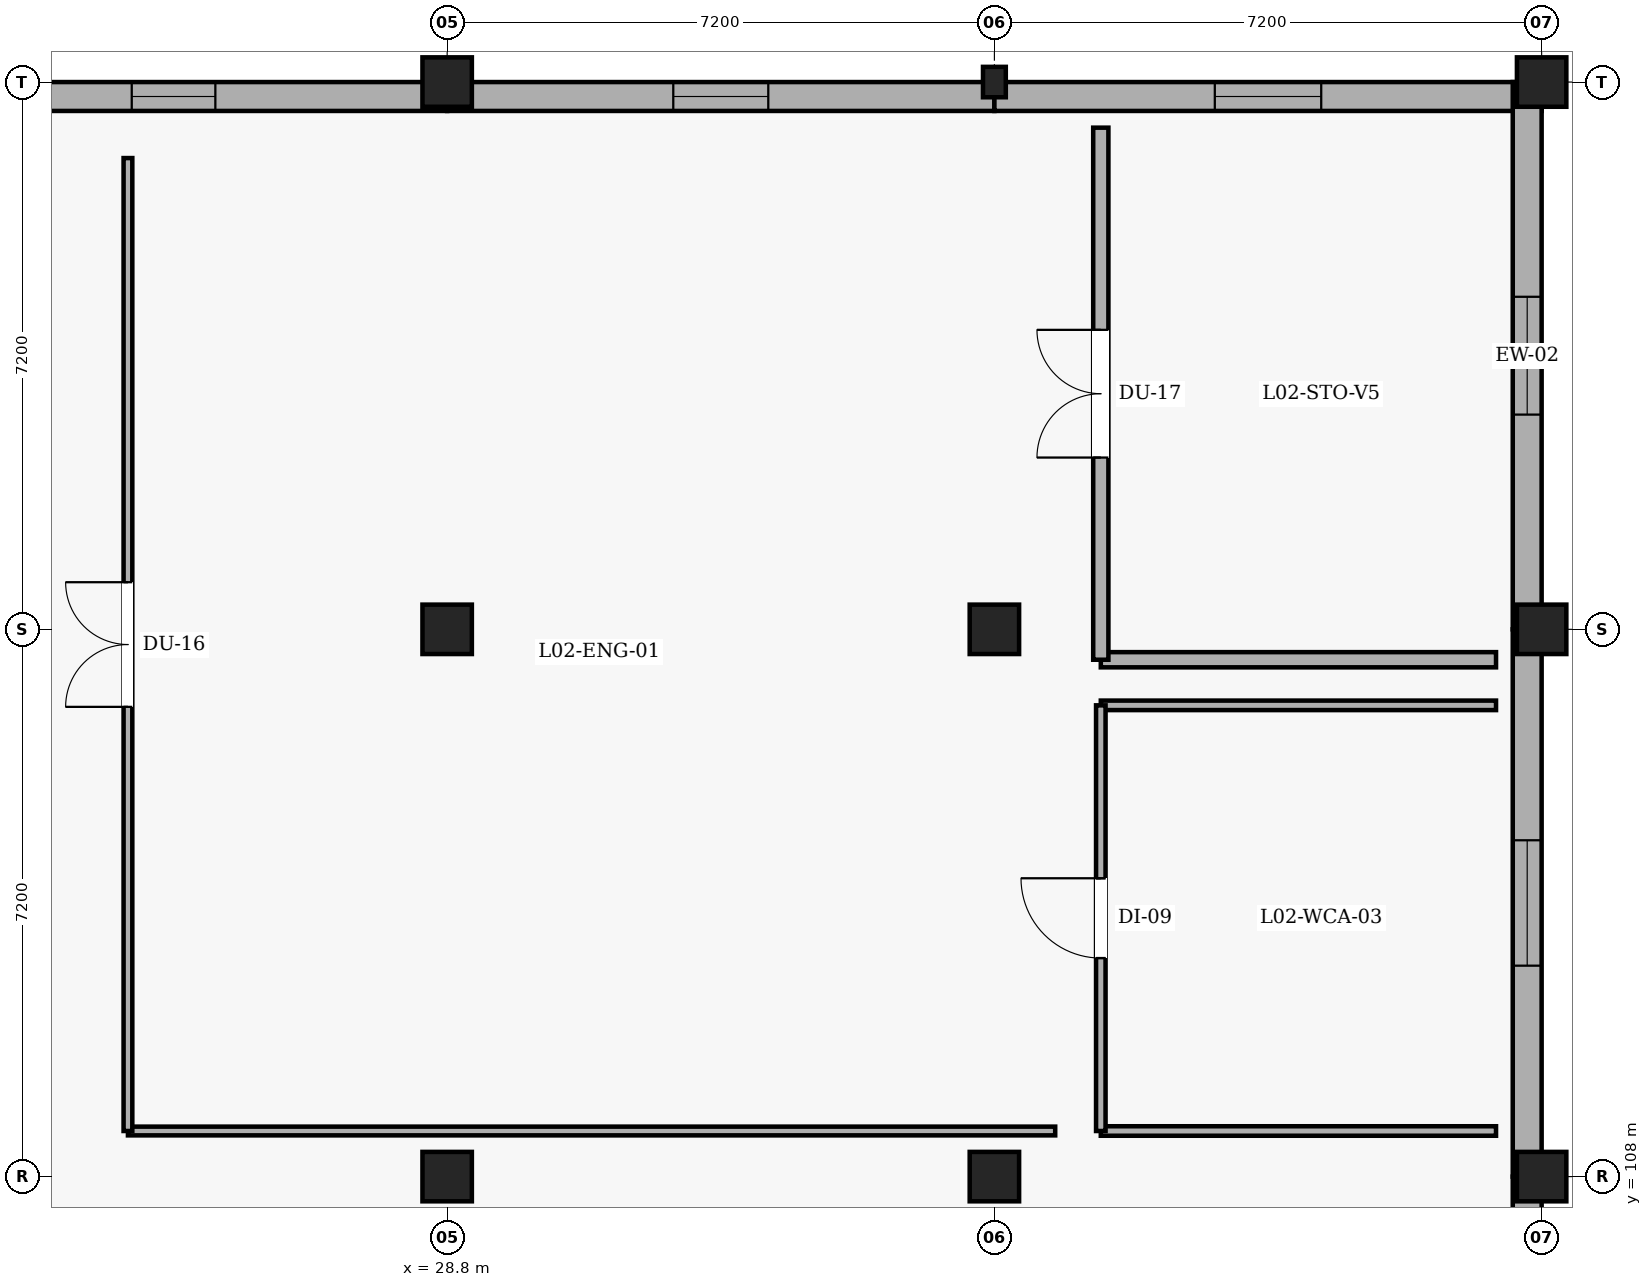
"""IFC4 building model, lengths in metres.
Left out: names, types, materials, properties, quantities, classifications, styles, units other than length and angle.
Written with IfcOpenShell. Run it as: python <this file> out.ifc"""

import sys

from ifc_helpers import new_model, si_unit, direction, frame, frame_2d, origin, origin_2d, place, context, subcontext, project, spatial, rectangle, extrude, element, fill, save


model = new_model("IFC4")
c1 = context("Model", 3, precision=1e-05, world=origin(), true_north=direction((0.0, 1.0)))
c2 = subcontext(c1, "Body", "Model", "MODEL_VIEW")
j1 = project(units=[si_unit("LENGTHUNIT", "METRE"), si_unit("PLANEANGLEUNIT", "RADIAN")], contexts=[c1])
p1 = place(None, origin())
s1 = spatial("IfcSite", under=j1, at=p1, CompositionType="ELEMENT")
p2 = place(p1, origin())
s2 = spatial("IfcBuilding", under=s1, at=p2, CompositionType="ELEMENT")
p3 = place(p2, frame((0.0, 0.0, 9.6)))
s3 = spatial("IfcBuildingStorey", under=s2, at=p3, CompositionType="ELEMENT", Elevation=9.6)
for number, where, z_axis, x_axis in (
    (1, (28.8, 108.0, 0.0), (0.0, 0.0, 1.0), (1.0, 0.0, 0.0)),
    (2, (28.8, 115.2, 0.0), (0.0, 0.0, 1.0), (1.0, 0.0, 0.0)),
    (3, (28.8, 122.4, 0.0), (0.0, 0.0, 1.0), (1.0, 0.0, 0.0)),
    (4, (36.0, 108.0, 0.0), (0.0, 0.0, 1.0), (1.0, 0.0, 0.0)),
    (5, (36.0, 115.2, 0.0), (0.0, 0.0, 1.0), (1.0, 0.0, 0.0)),
):
    element("IfcColumn", number, at=place(p3, frame(where, z_axis=z_axis, x_axis=x_axis)), inside=s3, PredefinedType="COLUMN", context=c2, shape_type="SweptSolid", body=[
        extrude(rectangle(XDim=0.65, YDim=0.65, at=origin_2d()), origin(), (0.0, 0.0, 1.0), 3.88),
    ])
p4 = place(p3, frame((36.0, 122.4, 0.0), z_axis=(0.0, 0.0, 1.0), x_axis=(1.0, 0.0, 0.0)))
e6 = element("IfcColumn", 6, at=p4, inside=s3, PredefinedType="PILASTER", context=c2, shape_type="SweptSolid", body=[
    extrude(rectangle(XDim=0.3, YDim=0.4, at=origin_2d()), origin(), (0.0, 0.0, 1.0), 3.88),
])
for number, where, z_axis, x_axis in (
    (7, (43.2, 108.0, 0.0), (0.0, 0.0, 1.0), (1.0, 0.0, 0.0)),
    (8, (43.2, 115.2, 0.0), (0.0, 0.0, 1.0), (1.0, 0.0, 0.0)),
    (9, (43.2, 122.4, 0.0), (0.0, 0.0, 1.0), (1.0, 0.0, 0.0)),
):
    element("IfcColumn", number, at=place(p3, frame(where, z_axis=z_axis, x_axis=x_axis)), inside=s3, PredefinedType="COLUMN", context=c2, shape_type="SweptSolid", body=[
        extrude(rectangle(XDim=0.65, YDim=0.65, at=origin_2d()), origin(), (0.0, 0.0, 1.0), 3.88),
    ])
p5 = place(p3, frame((21.6, 122.21, 0.0), z_axis=(0.0, 0.0, 1.0), x_axis=(1.0, 0.0, 0.0)))
e10 = element("IfcWall", 10, at=p5, inside=s3, PredefinedType="SOLIDWALL", context=c2, shape_type="SweptSolid", body=[
    extrude(rectangle(XDim=7.2, YDim=0.38, at=frame_2d((3.6, 0.0))), origin(), (0.0, 0.0, 1.0), 3.58),
])
p6 = place(p5, frame((3.05, 0.0, 0.9)))
e11 = element("IfcOpeningElement", 11, at=p6, cuts=e10, PredefinedType="OPENING", context=c2, shape_type="SweptSolid", body=[
    extrude(rectangle(XDim=1.1, YDim=1.2, at=frame_2d((0.55, 0.6))), frame((0.0, 0.2, 0.0), z_axis=(0.0, -1.0, 0.0), x_axis=(1.0, 0.0, 0.0)), (0.0, 0.0, 1.0), 0.4),
])
p7 = place(p3, frame((28.8, 122.21, 0.0), z_axis=(0.0, 0.0, 1.0), x_axis=(1.0, 0.0, 0.0)))
e12 = element("IfcWall", 12, at=p7, inside=s3, PredefinedType="SOLIDWALL", context=c2, shape_type="SweptSolid", body=[
    extrude(rectangle(XDim=7.2, YDim=0.38, at=frame_2d((3.6, 0.0))), origin(), (0.0, 0.0, 1.0), 3.58),
])
p8 = place(p7, frame((2.975, 0.0, 0.9)))
e13 = element("IfcOpeningElement", 13, at=p8, cuts=e12, PredefinedType="OPENING", context=c2, shape_type="SweptSolid", body=[
    extrude(rectangle(XDim=1.25, YDim=1.25, at=frame_2d((0.625, 0.625))), frame((0.0, 0.2, 0.0), z_axis=(0.0, -1.0, 0.0), x_axis=(1.0, 0.0, 0.0)), (0.0, 0.0, 1.0), 0.4),
])
p9 = place(p3, frame((36.0, 122.21, 0.0), z_axis=(0.0, 0.0, 1.0), x_axis=(1.0, 0.0, 0.0)))
e14 = element("IfcWall", 14, at=p9, inside=s3, PredefinedType="SOLIDWALL", context=c2, shape_type="SweptSolid", body=[
    extrude(rectangle(XDim=7.2, YDim=0.38, at=frame_2d((3.6, 0.0))), origin(), (0.0, 0.0, 1.0), 3.64),
])
p10 = place(p9, frame((2.9, 0.0, 0.9)))
e15 = element("IfcOpeningElement", 15, at=p10, cuts=e14, PredefinedType="OPENING", context=c2, shape_type="SweptSolid", body=[
    extrude(rectangle(XDim=1.4, YDim=1.3, at=frame_2d((0.7, 0.65))), frame((0.0, 0.2, 0.0), z_axis=(0.0, -1.0, 0.0), x_axis=(1.0, 0.0, 0.0)), (0.0, 0.0, 1.0), 0.4),
])
p11 = place(p3, frame((43.01, 122.4, 0.0), z_axis=(0.0, 0.0, 1.0), x_axis=(0.0, -1.0, 0.0)))
e16 = element("IfcWall", 16, at=p11, inside=s3, PredefinedType="SOLIDWALL", context=c2, shape_type="SweptSolid", body=[
    extrude(rectangle(XDim=7.2, YDim=0.38, at=frame_2d((3.6, 0.0))), origin(), (0.0, 0.0, 1.0), 3.64),
])
p12 = place(p11, frame((2.825, 0.0, 0.9)))
e17 = element("IfcOpeningElement", 17, at=p12, cuts=e16, PredefinedType="OPENING", context=c2, shape_type="SweptSolid", body=[
    extrude(rectangle(XDim=1.55, YDim=1.35, at=frame_2d((0.775, 0.675))), frame((0.0, 0.2, 0.0), z_axis=(0.0, -1.0, 0.0), x_axis=(1.0, 0.0, 0.0)), (0.0, 0.0, 1.0), 0.4),
])
p13 = place(p3, frame((43.01, 115.2, 0.0), z_axis=(0.0, 0.0, 1.0), x_axis=(0.0, -1.0, 0.0)))
e18 = element("IfcWall", 18, at=p13, inside=s3, PredefinedType="SOLIDWALL", context=c2, shape_type="SweptSolid", body=[
    extrude(rectangle(XDim=7.2, YDim=0.38, at=frame_2d((3.6, 0.0))), origin(), (0.0, 0.0, 1.0), 3.64),
])
p14 = place(p13, frame((2.775, 0.0, 0.9)))
e19 = element("IfcOpeningElement", 19, at=p14, cuts=e18, PredefinedType="OPENING", context=c2, shape_type="SweptSolid", body=[
    extrude(rectangle(XDim=1.65, YDim=1.4, at=frame_2d((0.825, 0.7))), frame((0.0, 0.2, 0.0), z_axis=(0.0, -1.0, 0.0), x_axis=(1.0, 0.0, 0.0)), (0.0, 0.0, 1.0), 0.4),
])
p15 = place(p3, frame((43.01, 108.0, 0.0), z_axis=(0.0, 0.0, 1.0), x_axis=(0.0, -1.0, 0.0)))
e20 = element("IfcWall", 20, at=p15, inside=s3, PredefinedType="SOLIDWALL", context=c2, shape_type="SweptSolid", body=[
    extrude(rectangle(XDim=7.2, YDim=0.38, at=frame_2d((3.6, 0.0))), origin(), (0.0, 0.0, 1.0), 3.64),
])
p16 = place(p15, frame((2.725, 0.0, 0.9)))
e21 = element("IfcOpeningElement", 21, at=p16, cuts=e20, PredefinedType="OPENING", context=c2, shape_type="SweptSolid", body=[
    extrude(rectangle(XDim=1.75, YDim=1.45, at=frame_2d((0.875, 0.725))), frame((0.0, 0.2, 0.0), z_axis=(0.0, -1.0, 0.0), x_axis=(1.0, 0.0, 0.0)), (0.0, 0.0, 1.0), 0.4),
])
p17 = place(p3, frame((36.8, 108.6, 0.0), z_axis=(0.0, 0.0, 1.0), x_axis=(-1.0, 0.0, 0.0)))
e22 = element("IfcWall", 22, at=p17, inside=s3, PredefinedType="PARTITIONING", context=c2, shape_type="SweptSolid", body=[
    extrude(rectangle(XDim=12.2, YDim=0.115, at=frame_2d((6.1, 0.0))), origin(), (0.0, 0.0, 1.0), 3.43),
])
p18 = place(p3, frame((24.6, 108.6, 0.0), z_axis=(0.0, 0.0, 1.0), x_axis=(0.0, 1.0, 0.0)))
e23 = element("IfcWall", 23, at=p18, inside=s3, PredefinedType="PARTITIONING", context=c2, shape_type="SweptSolid", body=[
    extrude(rectangle(XDim=12.8, YDim=0.115, at=frame_2d((6.4, 0.0))), origin(), (0.0, 0.0, 1.0), 3.43),
])
p19 = place(p18, frame((5.58, 0.0, 0.0)))
e24 = element("IfcOpeningElement", 24, at=p19, cuts=e23, PredefinedType="OPENING", context=c2, shape_type="SweptSolid", body=[
    extrude(rectangle(XDim=1.64, YDim=2.2, at=frame_2d((0.82, 1.1))), frame((0.0, 0.067, 0.0), z_axis=(0.0, -1.0, 0.0), x_axis=(1.0, 0.0, 0.0)), (0.0, 0.0, 1.0), 0.135),
])
for number, where, z_axis, x_axis in (
    (25, (37.4, 114.2, 0.0), (0.0, 0.0, 1.0), (1.0, 0.0, 0.0)),
    (26, (42.6, 108.6, 0.0), (0.0, 0.0, 1.0), (-1.0, 0.0, 0.0)),
):
    element("IfcWall", number, at=place(p3, frame(where, z_axis=z_axis, x_axis=x_axis)), inside=s3, PredefinedType="PARTITIONING", context=c2, shape_type="SweptSolid", body=[
        extrude(rectangle(XDim=5.2, YDim=0.125, at=frame_2d((2.6, 0.0))), origin(), (0.0, 0.0, 1.0), 3.85),
    ])
p20 = place(p3, frame((37.4, 108.6, 0.0), z_axis=(0.0, 0.0, 1.0), x_axis=(0.0, 1.0, 0.0)))
e27 = element("IfcWall", 27, at=p20, inside=s3, PredefinedType="PARTITIONING", context=c2, shape_type="SweptSolid", body=[
    extrude(rectangle(XDim=5.6, YDim=0.125, at=frame_2d((2.8, 0.0))), origin(), (0.0, 0.0, 1.0), 3.67),
])
p21 = place(p20, frame((2.275, 0.0, 0.0)))
e28 = element("IfcOpeningElement", 28, at=p21, cuts=e27, PredefinedType="OPENING", context=c2, shape_type="SweptSolid", body=[
    extrude(rectangle(XDim=1.05, YDim=2.1, at=frame_2d((0.525, 1.05))), frame((0.0, 0.073, 0.0), z_axis=(0.0, -1.0, 0.0), x_axis=(1.0, 0.0, 0.0)), (0.0, 0.0, 1.0), 0.145),
])
p22 = place(p3, frame((42.6, 114.8, 0.0), z_axis=(0.0, 0.0, 1.0), x_axis=(-1.0, 0.0, 0.0)))
e29 = element("IfcWall", 29, at=p22, inside=s3, PredefinedType="PARTITIONING", context=c2, shape_type="SweptSolid", body=[
    extrude(rectangle(XDim=5.2, YDim=0.2, at=frame_2d((2.6, 0.0))), origin(), (0.0, 0.0, 1.0), 3.85),
])
p23 = place(p3, frame((37.4, 114.8, 0.0), z_axis=(0.0, 0.0, 1.0), x_axis=(0.0, 1.0, 0.0)))
e30 = element("IfcWall", 30, at=p23, inside=s3, PredefinedType="PARTITIONING", context=c2, shape_type="SweptSolid", body=[
    extrude(rectangle(XDim=7.0, YDim=0.2, at=frame_2d((3.5, 0.0))), origin(), (0.0, 0.0, 1.0), 3.49),
])
p24 = place(p23, frame((2.66, 0.0, 0.0)))
e31 = element("IfcOpeningElement", 31, at=p24, cuts=e30, PredefinedType="OPENING", context=c2, shape_type="SweptSolid", body=[
    extrude(rectangle(XDim=1.68, YDim=2.28, at=frame_2d((0.84, 1.14))), frame((0.0, 0.11, 0.0), z_axis=(0.0, -1.0, 0.0), x_axis=(1.0, 0.0, 0.0)), (0.0, 0.0, 1.0), 0.22),
])
p25 = place(p6, origin())
e32 = element("IfcWindow", 32, at=p25, inside=s3, PartitioningType="SINGLE_PANEL", PredefinedType="WINDOW", context=c2, shape_type="SweptSolid", body=[
    extrude(rectangle(XDim=1.1, YDim=1.2, at=frame_2d((0.55, 0.6))), frame((0.0, 0.03, 0.0), z_axis=(0.0, -1.0, 0.0), x_axis=(1.0, 0.0, 0.0)), (0.0, 0.0, 1.0), 0.06),
])
fill(e11, e32)
p26 = place(p8, origin())
e33 = element("IfcWindow", 33, at=p26, inside=s3, PartitioningType="SINGLE_PANEL", PredefinedType="WINDOW", context=c2, shape_type="SweptSolid", body=[
    extrude(rectangle(XDim=1.25, YDim=1.25, at=frame_2d((0.625, 0.625))), frame((0.0, 0.03, 0.0), z_axis=(0.0, -1.0, 0.0), x_axis=(1.0, 0.0, 0.0)), (0.0, 0.0, 1.0), 0.06),
])
fill(e13, e33)
p27 = place(p10, origin())
e34 = element("IfcWindow", 34, at=p27, inside=s3, PartitioningType="SINGLE_PANEL", PredefinedType="WINDOW", context=c2, shape_type="SweptSolid", body=[
    extrude(rectangle(XDim=1.4, YDim=1.3, at=frame_2d((0.7, 0.65))), frame((0.0, 0.03, 0.0), z_axis=(0.0, -1.0, 0.0), x_axis=(1.0, 0.0, 0.0)), (0.0, 0.0, 1.0), 0.06),
])
fill(e15, e34)
p28 = place(p12, origin())
e35 = element("IfcWindow", 35, at=p28, inside=s3, PartitioningType="SINGLE_PANEL", PredefinedType="WINDOW", context=c2, shape_type="SweptSolid", body=[
    extrude(rectangle(XDim=1.55, YDim=1.35, at=frame_2d((0.775, 0.675))), frame((0.0, 0.03, 0.0), z_axis=(0.0, -1.0, 0.0), x_axis=(1.0, 0.0, 0.0)), (0.0, 0.0, 1.0), 0.06),
])
fill(e17, e35)
p29 = place(p14, origin())
e36 = element("IfcWindow", 36, at=p29, inside=s3, PartitioningType="SINGLE_PANEL", PredefinedType="WINDOW", context=c2, shape_type="SweptSolid", body=[
    extrude(rectangle(XDim=1.65, YDim=1.4, at=frame_2d((0.825, 0.7))), frame((0.0, 0.03, 0.0), z_axis=(0.0, -1.0, 0.0), x_axis=(1.0, 0.0, 0.0)), (0.0, 0.0, 1.0), 0.06),
])
fill(e19, e36)
p30 = place(p19, origin())
e37 = element("IfcDoor", 37, at=p30, inside=s3, OperationType="DOUBLE_DOOR_SINGLE_SWING", PredefinedType="DOOR", context=c2, shape_type="SweptSolid", body=[
    extrude(rectangle(XDim=1.64, YDim=2.2, at=frame_2d((0.82, 1.1))), frame((0.0, 0.025, 0.0), z_axis=(0.0, -1.0, 0.0), x_axis=(1.0, 0.0, 0.0)), (0.0, 0.0, 1.0), 0.05),
])
fill(e24, e37)
p31 = place(p21, origin())
e38 = element("IfcDoor", 38, at=p31, inside=s3, OperationType="SINGLE_SWING_RIGHT", PredefinedType="DOOR", context=c2, shape_type="SweptSolid", body=[
    extrude(rectangle(XDim=1.05, YDim=2.1, at=frame_2d((0.525, 1.05))), frame((0.0, 0.025, 0.0), z_axis=(0.0, -1.0, 0.0), x_axis=(1.0, 0.0, 0.0)), (0.0, 0.0, 1.0), 0.05),
])
fill(e28, e38)
p32 = place(p24, origin())
e39 = element("IfcDoor", 39, at=p32, inside=s3, OperationType="DOUBLE_DOOR_SINGLE_SWING", PredefinedType="DOOR", context=c2, shape_type="SweptSolid", body=[
    extrude(rectangle(XDim=1.68, YDim=2.28, at=frame_2d((0.84, 1.14))), frame((0.0, 0.025, 0.0), z_axis=(0.0, -1.0, 0.0), x_axis=(1.0, 0.0, 0.0)), (0.0, 0.0, 1.0), 0.05),
])
fill(e31, e39)
save(model, sys.argv[1])
